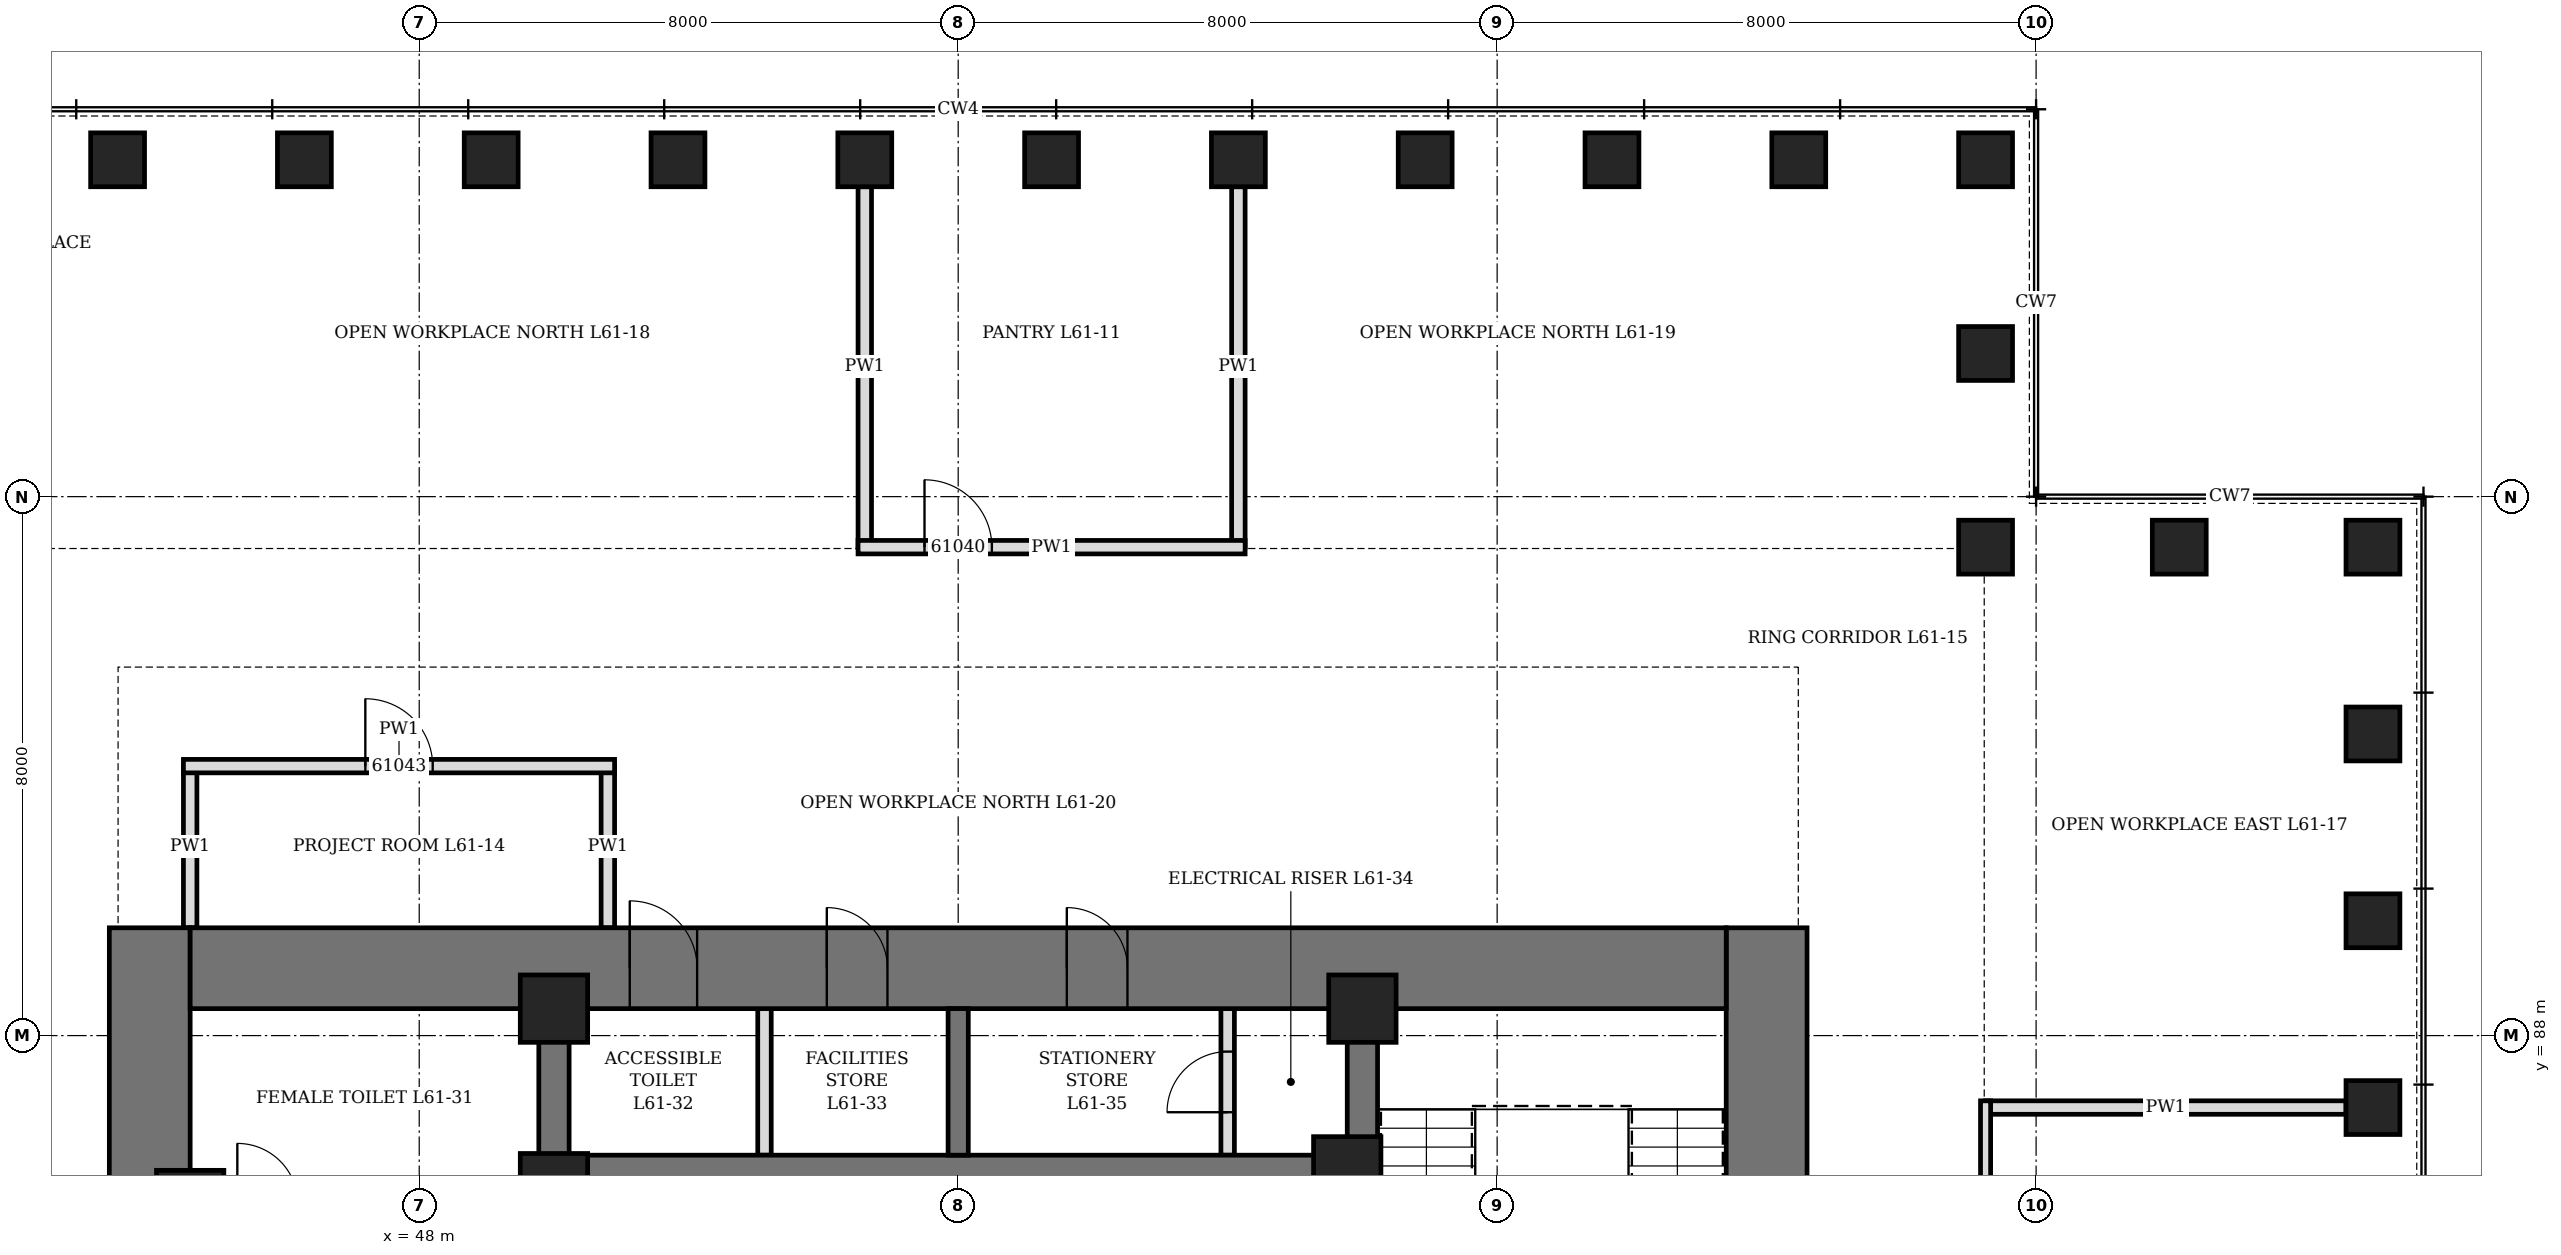
"""IFC4 building model, lengths in metres.
Left out: names, types, materials, properties, quantities, classifications, styles, units other than length and angle.
Written with IfcOpenShell. Run it as: python <this file> out.ifc"""

import sys

from ifc_helpers import new_model, si_unit, direction, frame, frame_2d, origin, origin_2d, place, context, subcontext, project, spatial, rectangle, hollow_rectangle, extrude, element, fill, save


model = new_model("IFC4")
c1 = context("Model", 3, precision=1e-05, world=origin(), true_north=direction((0.0, 1.0)))
c2 = subcontext(c1, "Body", "Model", "MODEL_VIEW")
j1 = project(units=[si_unit("LENGTHUNIT", "METRE"), si_unit("PLANEANGLEUNIT", "RADIAN")], contexts=[c1])
p1 = place(None, origin())
s1 = spatial("IfcSite", under=j1, at=p1, CompositionType="ELEMENT")
p2 = place(p1, origin())
s2 = spatial("IfcBuilding", under=s1, at=p2, CompositionType="ELEMENT")
p3 = place(p2, frame((0.0, 0.0, 271.3)))
s3 = spatial("IfcBuildingStorey", under=s2, at=p3, CompositionType="ELEMENT", Elevation=271.3)
for number, where, z_axis, x_axis in (
    (1, (77.0, 86.932, 0.0), (0.0, 0.0, 1.0), (0.0, 1.0, 0.0)),
    (2, (77.0, 89.705, 0.0), (0.0, 0.0, 1.0), (0.0, 1.0, 0.0)),
    (3, (77.0, 92.477, 0.0), (0.0, 0.0, 1.0), (0.0, 1.0, 0.0)),
    (4, (77.0, 95.25, 0.0), (0.0, 0.0, 1.0), (1.0, 0.0, 0.0)),
    (5, (74.125, 95.25, 0.0), (0.0, 0.0, 1.0), (1.0, 0.0, 0.0)),
    (6, (71.25, 95.25, 0.0), (0.0, 0.0, 1.0), (0.0, 1.0, 0.0)),
    (7, (71.25, 98.125, 0.0), (0.0, 0.0, 1.0), (0.0, 1.0, 0.0)),
    (8, (71.25, 101.0, 0.0), (0.0, 0.0, 1.0), (1.0, 0.0, 0.0)),
    (9, (68.477, 101.0, 0.0), (0.0, 0.0, 1.0), (1.0, 0.0, 0.0)),
    (10, (65.705, 101.0, 0.0), (0.0, 0.0, 1.0), (1.0, 0.0, 0.0)),
    (11, (62.932, 101.0, 0.0), (0.0, 0.0, 1.0), (1.0, 0.0, 0.0)),
    (12, (60.159, 101.0, 0.0), (0.0, 0.0, 1.0), (1.0, 0.0, 0.0)),
    (13, (57.386, 101.0, 0.0), (0.0, 0.0, 1.0), (1.0, 0.0, 0.0)),
    (14, (54.614, 101.0, 0.0), (0.0, 0.0, 1.0), (1.0, 0.0, 0.0)),
    (15, (51.841, 101.0, 0.0), (0.0, 0.0, 1.0), (1.0, 0.0, 0.0)),
    (16, (49.068, 101.0, 0.0), (0.0, 0.0, 1.0), (1.0, 0.0, 0.0)),
    (17, (46.295, 101.0, 0.0), (0.0, 0.0, 1.0), (1.0, 0.0, 0.0)),
    (18, (43.523, 101.0, 0.0), (0.0, 0.0, 1.0), (1.0, 0.0, 0.0)),
):
    element("IfcColumn", number, at=place(p3, frame(where, z_axis=z_axis, x_axis=x_axis)), inside=s3, PredefinedType="COLUMN", context=c2, shape_type="SweptSolid", body=[
        extrude(hollow_rectangle(XDim=0.8, YDim=0.8, WallThickness=0.1, at=origin_2d()), origin(), (0.0, 0.0, 1.0), 4.2),
    ])
p4 = place(p3, frame((44.0, 70.4, 0.0), z_axis=(0.0, 0.0, 1.0), x_axis=(0.0, 1.0, 0.0)))
e19 = element("IfcWall", 19, at=p4, inside=s3, PredefinedType="SHEAR", context=c2, shape_type="SweptSolid", body=[
    extrude(rectangle(XDim=19.2, YDim=1.2, at=frame_2d((9.6, 0.0))), origin(), (0.0, 0.0, 1.0), 4.2),
])
p5 = place(p4, frame((8.6, 0.0, 0.0)))
e20 = element("IfcOpeningElement", 20, at=p5, cuts=e19, PredefinedType="OPENING", context=c2, shape_type="SweptSolid", body=[
    extrude(rectangle(XDim=2.0, YDim=2.4, at=frame_2d((1.0, 1.2))), frame((0.0, 0.61, 0.0), z_axis=(0.0, -1.0, 0.0), x_axis=(1.0, 0.0, 0.0)), (0.0, 0.0, 1.0), 1.22),
])
p6 = place(p3, frame((68.0, 70.4, 0.0), z_axis=(0.0, 0.0, 1.0), x_axis=(0.0, 1.0, 0.0)))
e21 = element("IfcWall", 21, at=p6, inside=s3, PredefinedType="SHEAR", context=c2, shape_type="SweptSolid", body=[
    extrude(rectangle(XDim=19.2, YDim=1.2, at=frame_2d((9.6, 0.0))), origin(), (0.0, 0.0, 1.0), 4.2),
])
p7 = place(p6, frame((8.6, 0.0, 0.0)))
e22 = element("IfcOpeningElement", 22, at=p7, cuts=e21, PredefinedType="OPENING", context=c2, shape_type="SweptSolid", body=[
    extrude(rectangle(XDim=2.0, YDim=2.4, at=frame_2d((1.0, 1.2))), frame((0.0, 0.61, 0.0), z_axis=(0.0, -1.0, 0.0), x_axis=(1.0, 0.0, 0.0)), (0.0, 0.0, 1.0), 1.22),
])
p8 = place(p3, frame((44.6, 89.0, 0.0), z_axis=(0.0, 0.0, 1.0), x_axis=(1.0, 0.0, 0.0)))
e23 = element("IfcWall", 23, at=p8, inside=s3, PredefinedType="SHEAR", context=c2, shape_type="SweptSolid", body=[
    extrude(rectangle(XDim=22.8, YDim=1.2, at=frame_2d((11.4, 0.0))), origin(), (0.0, 0.0, 1.0), 4.2),
])
p9 = place(p8, frame((6.525, 0.0, 0.0)))
e24 = element("IfcOpeningElement", 24, at=p9, cuts=e23, PredefinedType="OPENING", context=c2, shape_type="SweptSolid", body=[
    extrude(rectangle(XDim=1.0, YDim=2.1, at=frame_2d((0.5, 1.05))), frame((0.0, 0.61, 0.0), z_axis=(0.0, -1.0, 0.0), x_axis=(1.0, 0.0, 0.0)), (0.0, 0.0, 1.0), 1.22),
])
p10 = place(p8, frame((9.45, 0.0, 0.0)))
e25 = element("IfcOpeningElement", 25, at=p10, cuts=e23, PredefinedType="OPENING", context=c2, shape_type="SweptSolid", body=[
    extrude(rectangle(XDim=0.9, YDim=2.1, at=frame_2d((0.45, 1.05))), frame((0.0, 0.61, 0.0), z_axis=(0.0, -1.0, 0.0), x_axis=(1.0, 0.0, 0.0)), (0.0, 0.0, 1.0), 1.22),
])
p11 = place(p8, frame((13.012, 0.0, 0.0)))
e26 = element("IfcOpeningElement", 26, at=p11, cuts=e23, PredefinedType="OPENING", context=c2, shape_type="SweptSolid", body=[
    extrude(rectangle(XDim=0.9, YDim=2.1, at=frame_2d((0.45, 1.05))), frame((0.0, 0.61, 0.0), z_axis=(0.0, -1.0, 0.0), x_axis=(1.0, 0.0, 0.0)), (0.0, 0.0, 1.0), 1.22),
])
p12 = place(p3, frame((50.0, 71.6, 0.0), z_axis=(0.0, 0.0, 1.0), x_axis=(0.0, 1.0, 0.0)))
e27 = element("IfcWall", 27, at=p12, inside=s3, PredefinedType="SHEAR", context=c2, shape_type="SweptSolid", body=[
    extrude(rectangle(XDim=16.8, YDim=0.45, at=frame_2d((8.4, 0.0))), origin(), (0.0, 0.0, 1.0), 4.2),
])
p13 = place(p12, frame((7.5, 0.0, 0.0)))
e28 = element("IfcOpeningElement", 28, at=p13, cuts=e27, PredefinedType="OPENING", context=c2, shape_type="SweptSolid", body=[
    extrude(rectangle(XDim=1.8, YDim=2.4, at=frame_2d((0.9, 1.2))), frame((0.0, 0.235, 0.0), z_axis=(0.0, -1.0, 0.0), x_axis=(1.0, 0.0, 0.0)), (0.0, 0.0, 1.0), 0.47),
])
p14 = place(p3, frame((62.0, 71.6, 0.0), z_axis=(0.0, 0.0, 1.0), x_axis=(0.0, 1.0, 0.0)))
e29 = element("IfcWall", 29, at=p14, inside=s3, PredefinedType="SHEAR", context=c2, shape_type="SweptSolid", body=[
    extrude(rectangle(XDim=16.8, YDim=0.45, at=frame_2d((8.4, 0.0))), origin(), (0.0, 0.0, 1.0), 4.2),
])
p15 = place(p14, frame((7.5, 0.0, 0.0)))
e30 = element("IfcOpeningElement", 30, at=p15, cuts=e29, PredefinedType="OPENING", context=c2, shape_type="SweptSolid", body=[
    extrude(rectangle(XDim=1.8, YDim=2.4, at=frame_2d((0.9, 1.2))), frame((0.0, 0.235, 0.0), z_axis=(0.0, -1.0, 0.0), x_axis=(1.0, 0.0, 0.0)), (0.0, 0.0, 1.0), 0.47),
])
p16 = place(p3, frame((50.225, 86.0, 0.0), z_axis=(0.0, 0.0, 1.0), x_axis=(1.0, 0.0, 0.0)))
e31 = element("IfcWall", 31, at=p16, inside=s3, PredefinedType="SHEAR", context=c2, shape_type="SweptSolid", body=[
    extrude(rectangle(XDim=11.55, YDim=0.45, at=frame_2d((5.775, 0.0))), origin(), (0.0, 0.0, 1.0), 4.2),
])
p17 = place(p3, frame((56.0, 86.225, 0.0), z_axis=(0.0, 0.0, 1.0), x_axis=(0.0, 1.0, 0.0)))
e32 = element("IfcWall", 32, at=p17, inside=s3, PredefinedType="SHEAR", context=c2, shape_type="SweptSolid", body=[
    extrude(rectangle(XDim=2.175, YDim=0.3, at=frame_2d((1.087, 0.0))), origin(), (0.0, 0.0, 1.0), 4.2),
])
for number, where, z_axis, x_axis in (
    (33, (44.6, 85.5, 0.0), (0.0, 0.0, 1.0), (1.0, 0.0, 0.0)),
    (34, (50.0, 85.75, 0.0), (0.0, 0.0, 1.0), (1.0, 0.0, 0.0)),
    (35, (50.0, 88.4, 0.0), (0.0, 0.0, 1.0), (1.0, 0.0, 0.0)),
    (36, (61.775, 86.0, 0.0), (0.0, 0.0, 1.0), (1.0, 0.0, 0.0)),
    (37, (62.0, 88.4, 0.0), (0.0, 0.0, 1.0), (1.0, 0.0, 0.0)),
):
    element("IfcColumn", number, at=place(p3, frame(where, z_axis=z_axis, x_axis=x_axis)), inside=s3, PredefinedType="COLUMN", context=c2, shape_type="SweptSolid", body=[
        extrude(hollow_rectangle(XDim=1.0, YDim=1.0, WallThickness=0.15, at=origin_2d()), origin(), (0.0, 0.0, 1.0), 4.2),
    ])
p18 = place(p3, frame((53.125, 86.225, 0.0), z_axis=(0.0, 0.0, 1.0), x_axis=(0.0, 1.0, 0.0)))
e38 = element("IfcWall", 38, at=p18, inside=s3, PredefinedType="PARTITIONING", context=c2, shape_type="SweptSolid", body=[
    extrude(rectangle(XDim=2.175, YDim=0.2, at=frame_2d((1.087, 0.0))), origin(), (0.0, 0.0, 1.0), 4.04),
])
p19 = place(p3, frame((60.0, 86.225, 0.0), z_axis=(0.0, 0.0, 1.0), x_axis=(0.0, 1.0, 0.0)))
e39 = element("IfcWall", 39, at=p19, inside=s3, PredefinedType="PARTITIONING", context=c2, shape_type="SweptSolid", body=[
    extrude(rectangle(XDim=2.175, YDim=0.2, at=frame_2d((1.087, 0.0))), origin(), (0.0, 0.0, 1.0), 4.04),
])
p20 = place(p19, frame((0.637, 0.0, 0.0)))
e40 = element("IfcOpeningElement", 40, at=p20, cuts=e39, PredefinedType="OPENING", context=c2, shape_type="SweptSolid", body=[
    extrude(rectangle(XDim=0.9, YDim=2.1, at=frame_2d((0.45, 1.05))), frame((0.0, 0.11, 0.0), z_axis=(0.0, -1.0, 0.0), x_axis=(1.0, 0.0, 0.0)), (0.0, 0.0, 1.0), 0.22),
])
for number, where, z_axis, x_axis in (
    (41, (71.25, 86.932, 0.0), (0.0, 0.0, 1.0), (1.0, 0.0, 0.0)),
    (42, (54.614, 95.25, 0.0), (0.0, 0.0, 1.0), (0.0, 1.0, 0.0)),
    (43, (60.159, 95.25, 0.0), (0.0, 0.0, 1.0), (0.0, 1.0, 0.0)),
):
    element("IfcWall", number, at=place(p3, frame(where, z_axis=z_axis, x_axis=x_axis)), inside=s3, PredefinedType="PARTITIONING", context=c2, shape_type="SweptSolid", body=[
        extrude(rectangle(XDim=5.35, YDim=0.2, at=frame_2d((2.675, 0.0))), origin(), (0.0, 0.0, 1.0), 3.428),
    ])
for number, where, z_axis, x_axis in (
    (44, (44.6, 89.6, 0.0), (0.0, 0.0, 1.0), (0.0, 1.0, 0.0)),
    (45, (50.8, 89.6, 0.0), (0.0, 0.0, 1.0), (0.0, 1.0, 0.0)),
):
    element("IfcWall", number, at=place(p3, frame(where, z_axis=z_axis, x_axis=x_axis)), inside=s3, PredefinedType="PARTITIONING", context=c2, shape_type="SweptSolid", body=[
        extrude(rectangle(XDim=2.4, YDim=0.2, at=frame_2d((1.2, 0.0))), origin(), (0.0, 0.0, 1.0), 4.04),
    ])
p21 = place(p3, frame((44.5, 92.0, 0.0), z_axis=(0.0, 0.0, 1.0), x_axis=(1.0, 0.0, 0.0)))
e46 = element("IfcWall", 46, at=p21, inside=s3, PredefinedType="PARTITIONING", context=c2, shape_type="SweptSolid", body=[
    extrude(rectangle(XDim=6.4, YDim=0.2, at=frame_2d((3.2, 0.0))), origin(), (0.0, 0.0, 1.0), 4.04),
])
p22 = place(p21, frame((2.7, 0.0, 0.0)))
e47 = element("IfcOpeningElement", 47, at=p22, cuts=e46, PredefinedType="OPENING", context=c2, shape_type="SweptSolid", body=[
    extrude(rectangle(XDim=1.0, YDim=2.1, at=frame_2d((0.5, 1.05))), frame((0.0, 0.11, 0.0), z_axis=(0.0, -1.0, 0.0), x_axis=(1.0, 0.0, 0.0)), (0.0, 0.0, 1.0), 0.22),
])
p23 = place(p3, frame((54.514, 95.25, 0.0), z_axis=(0.0, 0.0, 1.0), x_axis=(1.0, 0.0, 0.0)))
e48 = element("IfcWall", 48, at=p23, inside=s3, PredefinedType="PARTITIONING", context=c2, shape_type="SweptSolid", body=[
    extrude(rectangle(XDim=5.745, YDim=0.2, at=frame_2d((2.873, 0.0))), origin(), (0.0, 0.0, 1.0), 4.04),
])
p24 = place(p23, frame((0.986, 0.0, 0.0)))
e49 = element("IfcOpeningElement", 49, at=p24, cuts=e48, PredefinedType="OPENING", context=c2, shape_type="SweptSolid", body=[
    extrude(rectangle(XDim=1.0, YDim=2.1, at=frame_2d((0.5, 1.05))), frame((0.0, 0.11, 0.0), z_axis=(0.0, -1.0, 0.0), x_axis=(1.0, 0.0, 0.0)), (0.0, 0.0, 1.0), 0.22),
])
p25 = place(p3, frame((71.25, 70.295, 0.0), z_axis=(0.0, 0.0, 1.0), x_axis=(0.0, 1.0, 0.0)))
e50 = element("IfcWall", 50, at=p25, inside=s3, PredefinedType="PARTITIONING", context=c2, shape_type="SweptSolid", body=[
    extrude(rectangle(XDim=16.736, YDim=0.15, at=frame_2d((8.368, 0.0))), origin(), (0.0, 0.0, 1.0), 4.04),
])
p26 = place(p25, frame((0.886, 0.0, 0.0)))
e51 = element("IfcOpeningElement", 51, at=p26, cuts=e50, PredefinedType="OPENING", context=c2, shape_type="SweptSolid", body=[
    extrude(rectangle(XDim=1.0, YDim=2.1, at=frame_2d((0.5, 1.05))), frame((0.0, 0.085, 0.0), z_axis=(0.0, -1.0, 0.0), x_axis=(1.0, 0.0, 0.0)), (0.0, 0.0, 1.0), 0.17),
])
p27 = place(p25, frame((6.432, 0.0, 0.0)))
e52 = element("IfcOpeningElement", 52, at=p27, cuts=e50, PredefinedType="OPENING", context=c2, shape_type="SweptSolid", body=[
    extrude(rectangle(XDim=1.0, YDim=2.1, at=frame_2d((0.5, 1.05))), frame((0.0, 0.085, 0.0), z_axis=(0.0, -1.0, 0.0), x_axis=(1.0, 0.0, 0.0)), (0.0, 0.0, 1.0), 0.17),
])
p28 = place(p25, frame((11.977, 0.0, 0.0)))
e53 = element("IfcOpeningElement", 53, at=p28, cuts=e50, PredefinedType="OPENING", context=c2, shape_type="SweptSolid", body=[
    extrude(rectangle(XDim=1.0, YDim=2.1, at=frame_2d((0.5, 1.05))), frame((0.0, 0.085, 0.0), z_axis=(0.0, -1.0, 0.0), x_axis=(1.0, 0.0, 0.0)), (0.0, 0.0, 1.0), 0.17),
])
p29 = place(p9, origin())
e54 = element("IfcDoor", 54, at=p29, inside=s3, OperationType="SINGLE_SWING_LEFT", PredefinedType="DOOR", context=c2, shape_type="SweptSolid", body=[
    extrude(rectangle(XDim=1.0, YDim=2.1, at=frame_2d((0.5, 1.05))), frame((0.0, 0.35, 0.0), z_axis=(0.0, -1.0, 0.0), x_axis=(1.0, 0.0, 0.0)), (0.0, 0.0, 1.0), 0.7),
])
fill(e24, e54)
p30 = place(p10, origin())
e55 = element("IfcDoor", 55, at=p30, inside=s3, OperationType="SINGLE_SWING_LEFT", PredefinedType="DOOR", context=c2, shape_type="SweptSolid", body=[
    extrude(rectangle(XDim=0.9, YDim=2.1, at=frame_2d((0.45, 1.05))), frame((0.0, 0.35, 0.0), z_axis=(0.0, -1.0, 0.0), x_axis=(1.0, 0.0, 0.0)), (0.0, 0.0, 1.0), 0.7),
])
fill(e25, e55)
p31 = place(p11, origin())
e56 = element("IfcDoor", 56, at=p31, inside=s3, OperationType="SINGLE_SWING_LEFT", PredefinedType="DOOR", context=c2, shape_type="SweptSolid", body=[
    extrude(rectangle(XDim=0.9, YDim=2.1, at=frame_2d((0.45, 1.05))), frame((0.0, 0.35, 0.0), z_axis=(0.0, -1.0, 0.0), x_axis=(1.0, 0.0, 0.0)), (0.0, 0.0, 1.0), 0.7),
])
fill(e26, e56)
p32 = place(p20, origin())
e57 = element("IfcDoor", 57, at=p32, inside=s3, OperationType="SINGLE_SWING_LEFT", PredefinedType="DOOR", context=c2, shape_type="SweptSolid", body=[
    extrude(rectangle(XDim=0.9, YDim=2.1, at=frame_2d((0.45, 1.05))), frame((0.0, 0.1, 0.0), z_axis=(0.0, -1.0, 0.0), x_axis=(1.0, 0.0, 0.0)), (0.0, 0.0, 1.0), 0.199),
])
fill(e40, e57)
p33 = place(p24, origin())
e58 = element("IfcDoor", 58, at=p33, inside=s3, OperationType="SINGLE_SWING_LEFT", PredefinedType="DOOR", context=c2, shape_type="SweptSolid", body=[
    extrude(rectangle(XDim=1.0, YDim=2.1, at=frame_2d((0.5, 1.05))), frame((0.0, 0.1, 0.0), z_axis=(0.0, -1.0, 0.0), x_axis=(1.0, 0.0, 0.0)), (0.0, 0.0, 1.0), 0.199),
])
fill(e49, e58)
p34 = place(p22, origin())
e59 = element("IfcDoor", 59, at=p34, inside=s3, OperationType="SINGLE_SWING_LEFT", PredefinedType="DOOR", context=c2, shape_type="SweptSolid", body=[
    extrude(rectangle(XDim=1.0, YDim=2.1, at=frame_2d((0.5, 1.05))), frame((0.0, 0.1, 0.0), z_axis=(0.0, -1.0, 0.0), x_axis=(1.0, 0.0, 0.0)), (0.0, 0.0, 1.0), 0.199),
])
fill(e47, e59)
save(model, sys.argv[1])
